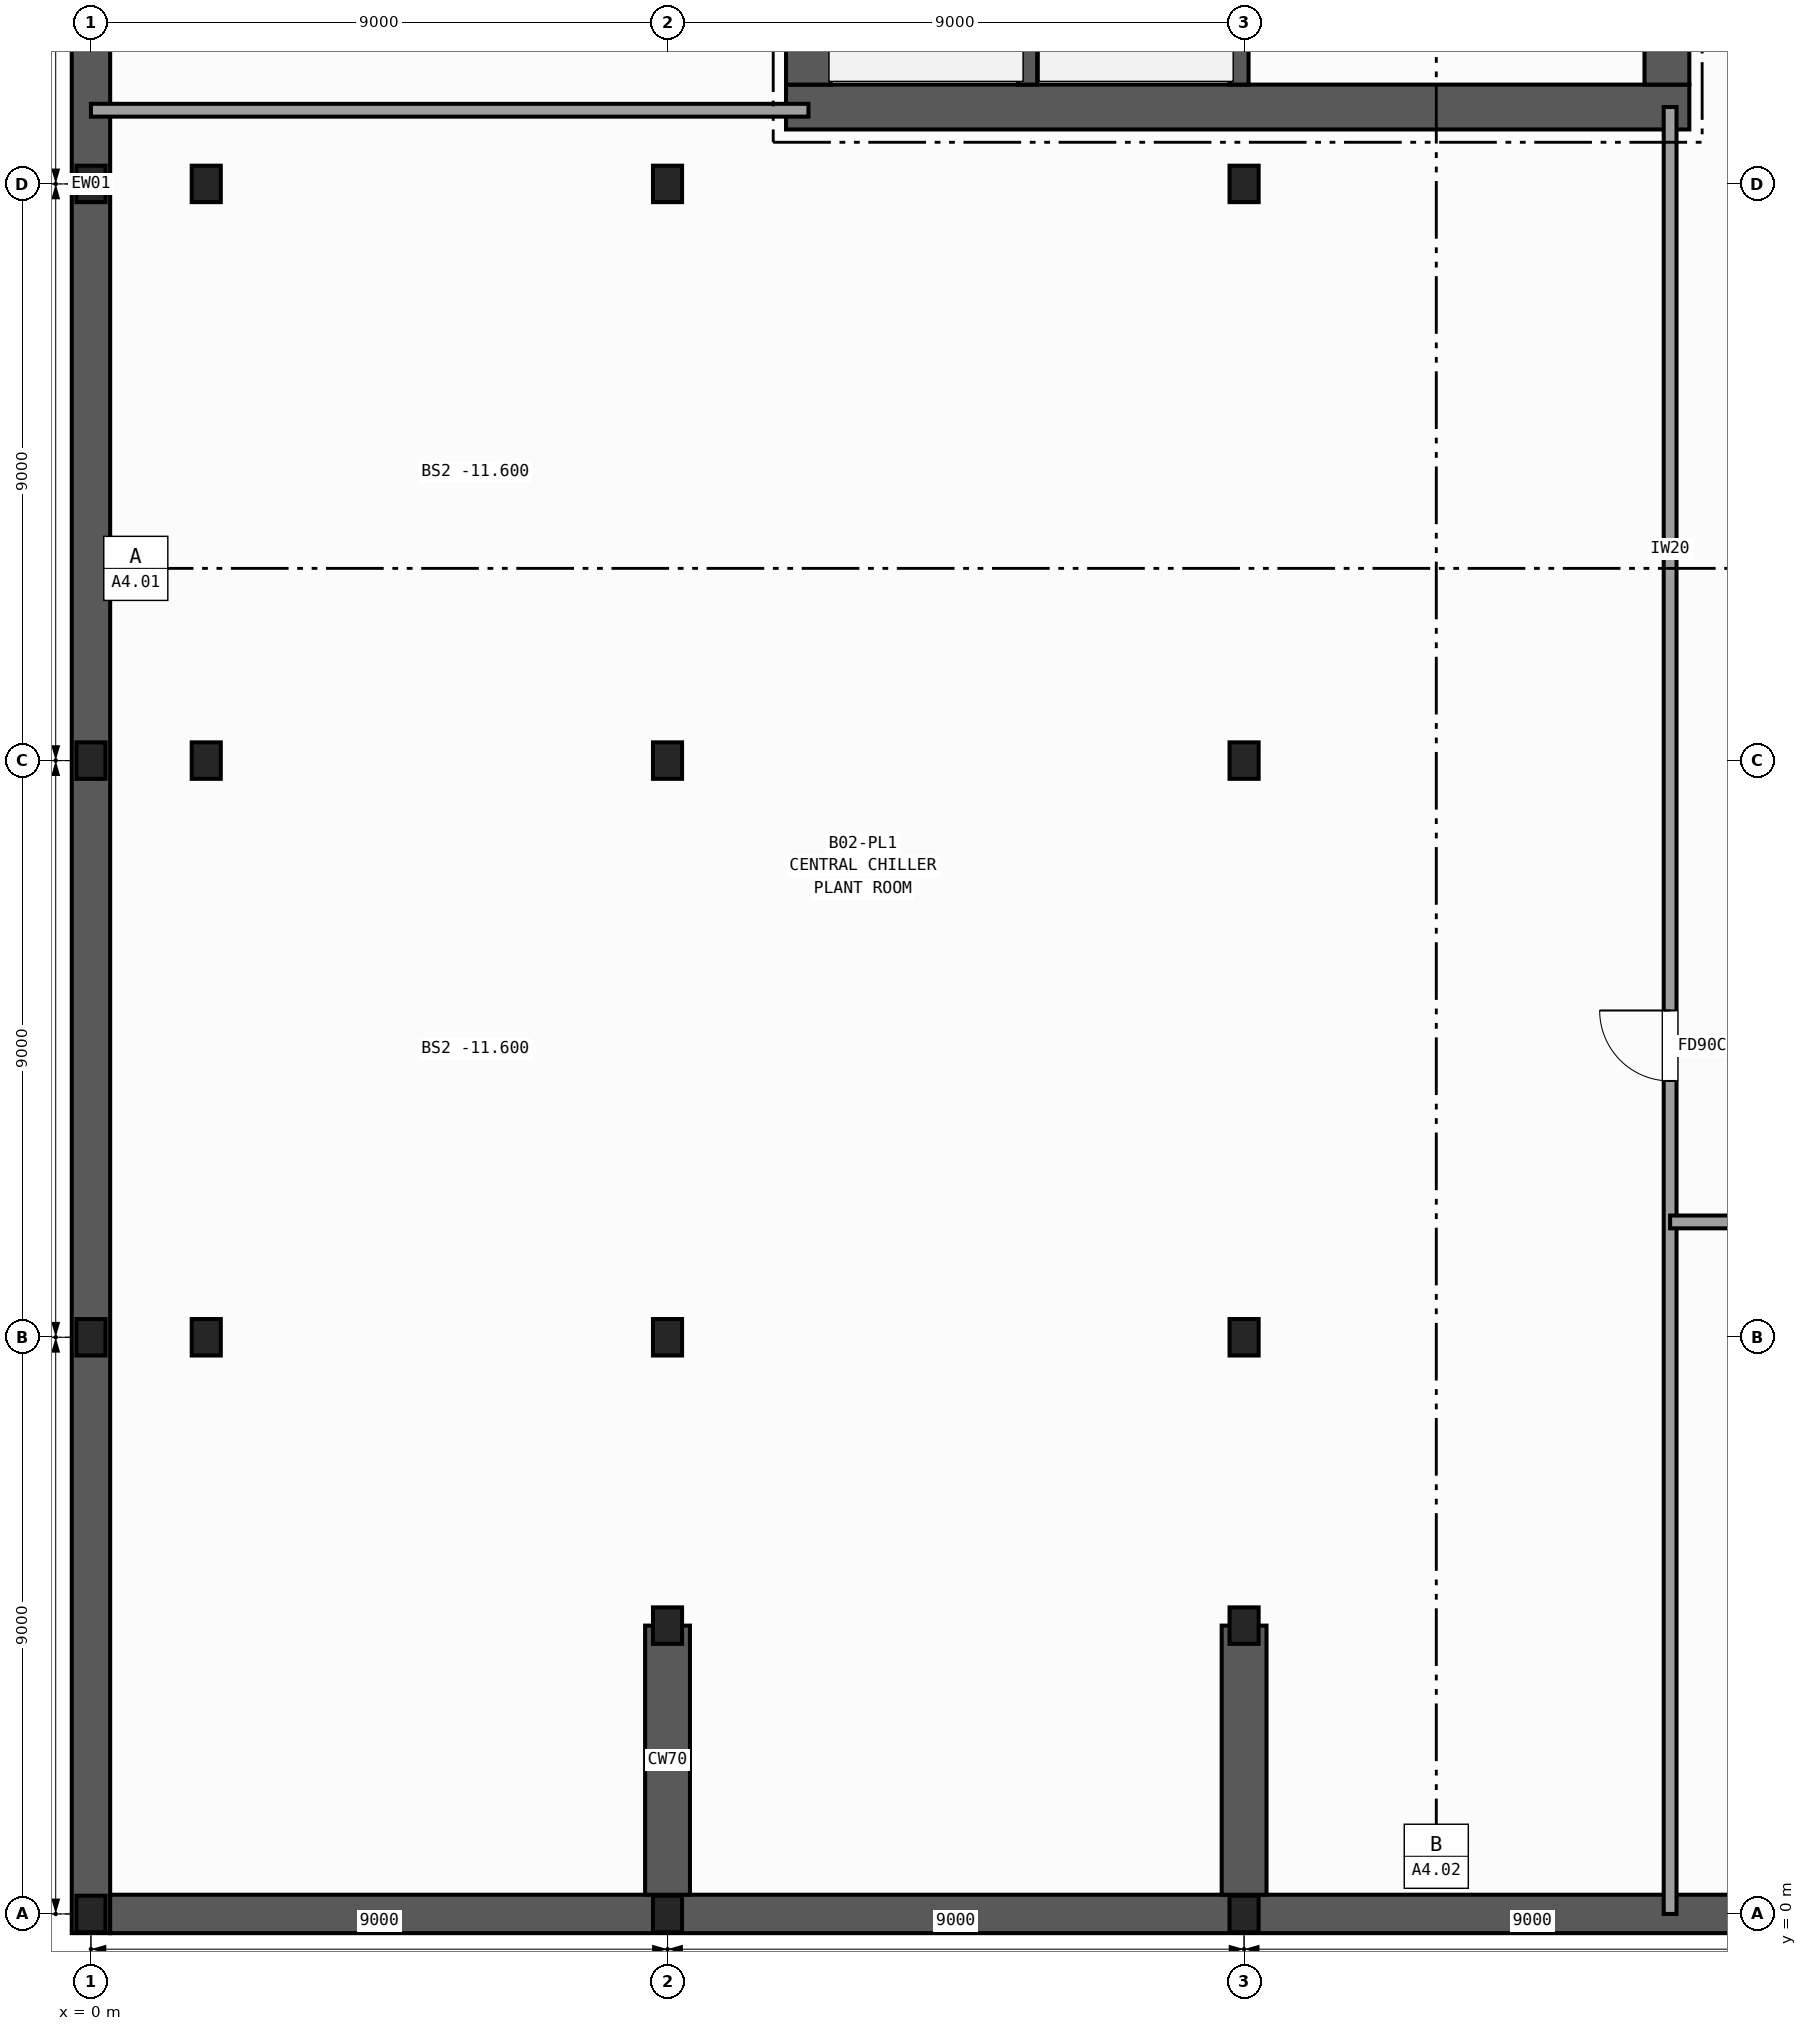
"""IFC4 building model, lengths in metres.
Left out: names, types, materials, properties, quantities, classifications, styles, units other than length and angle.
Written with IfcOpenShell. Run it as: python <this file> out.ifc"""

import sys

from ifc_helpers import new_model, si_unit, direction, frame, frame_2d, origin, origin_2d, place, context, subcontext, project, spatial, rectangle, i_section, extrude, element, fill, save


model = new_model("IFC4")
c1 = context("Model", 3, precision=1e-05, world=origin(), true_north=direction((0.0, 1.0)))
c2 = subcontext(c1, "Body", "Model", "MODEL_VIEW")
j1 = project(units=[si_unit("LENGTHUNIT", "METRE"), si_unit("PLANEANGLEUNIT", "RADIAN")], contexts=[c1])
p1 = place(None, origin())
s1 = spatial("IfcSite", under=j1, at=p1, CompositionType="ELEMENT")
p2 = place(p1, origin())
s2 = spatial("IfcBuilding", under=s1, at=p2, CompositionType="ELEMENT")
p3 = place(p2, frame((0.0, 0.0, -9.0)))
s3 = spatial("IfcBuildingStorey", under=s2, at=p3, CompositionType="ELEMENT", Elevation=-9.0)
for number, where, z_axis, x_axis in (
    (1, (0.0, 0.0, 0.0), (0.0, 0.0, 1.0), (1.0, 0.0, 0.0)),
    (2, (0.0, 9.0, 0.0), (0.0, 0.0, 1.0), (1.0, 0.0, 0.0)),
    (3, (0.0, 18.0, 0.0), (0.0, 0.0, 1.0), (1.0, 0.0, 0.0)),
    (4, (0.0, 27.0, 0.0), (0.0, 0.0, 1.0), (1.0, 0.0, 0.0)),
    (5, (9.0, 0.0, 0.0), (0.0, 0.0, 1.0), (1.0, 0.0, 0.0)),
    (6, (9.0, 9.0, 0.0), (0.0, 0.0, 1.0), (1.0, 0.0, 0.0)),
    (7, (9.0, 18.0, 0.0), (0.0, 0.0, 1.0), (1.0, 0.0, 0.0)),
    (8, (9.0, 27.0, 0.0), (0.0, 0.0, 1.0), (1.0, 0.0, 0.0)),
    (9, (18.0, 0.0, 0.0), (0.0, 0.0, 1.0), (1.0, 0.0, 0.0)),
    (10, (18.0, 9.0, 0.0), (0.0, 0.0, 1.0), (1.0, 0.0, 0.0)),
    (11, (18.0, 18.0, 0.0), (0.0, 0.0, 1.0), (1.0, 0.0, 0.0)),
    (12, (18.0, 27.0, 0.0), (0.0, 0.0, 1.0), (1.0, 0.0, 0.0)),
    (13, (9.0, 4.5, 0.0), (0.0, 0.0, 1.0), (1.0, 0.0, 0.0)),
    (14, (18.0, 4.5, 0.0), (0.0, 0.0, 1.0), (1.0, 0.0, 0.0)),
    (15, (1.8, 9.0, 0.0), (0.0, 0.0, 1.0), (1.0, 0.0, 0.0)),
    (16, (1.8, 18.0, 0.0), (0.0, 0.0, 1.0), (1.0, 0.0, 0.0)),
    (17, (1.8, 27.0, 0.0), (0.0, 0.0, 1.0), (1.0, 0.0, 0.0)),
):
    element("IfcColumn", number, at=place(p3, frame(where, z_axis=z_axis, x_axis=x_axis)), inside=s3, PredefinedType="COLUMN", context=c2, shape_type="SweptSolid", body=[
        extrude(i_section(OverallWidth=0.454, OverallDepth=0.569, WebThickness=0.078, FlangeThickness=0.125, FilletRadius=0.015, at=origin_2d()), origin(), (0.0, 0.0, 1.0), 4.5),
    ])
p4 = place(p3, frame((0.0, -0.3, 0.0), z_axis=(0.0, 0.0, 1.0), x_axis=(0.0, 1.0, 0.0)))
e18 = element("IfcWall", 18, at=p4, inside=s3, PredefinedType="SOLIDWALL", context=c2, shape_type="SweptSolid", body=[
    extrude(rectangle(XDim=54.6, YDim=0.6, at=frame_2d((27.3, 0.0))), origin(), (0.0, 0.0, 1.0), 4.15),
])
p5 = place(p3, frame((62.7, 0.0, 0.0), z_axis=(0.0, 0.0, 1.0), x_axis=(-1.0, 0.0, 0.0)))
e19 = element("IfcWall", 19, at=p5, inside=s3, PredefinedType="SOLIDWALL", context=c2, shape_type="SweptSolid", body=[
    extrude(rectangle(XDim=62.4, YDim=0.6, at=frame_2d((31.2, 0.0))), origin(), (0.0, 0.0, 1.0), 4.15),
])
for number, where, z_axis, x_axis in (
    (20, (9.0, 0.3, 0.0), (0.0, 0.0, 1.0), (0.0, 1.0, 0.0)),
    (21, (18.0, 0.3, 0.0), (0.0, 0.0, 1.0), (0.0, 1.0, 0.0)),
):
    element("IfcWall", number, at=place(p3, frame(where, z_axis=z_axis, x_axis=x_axis)), inside=s3, PredefinedType="SHEAR", context=c2, shape_type="SweptSolid", body=[
        extrude(rectangle(XDim=4.2, YDim=0.7, at=frame_2d((2.1, 0.0))), origin(), (0.0, 0.0, 1.0), 4.15),
    ])
p6 = place(p3, frame((10.85, 28.2, 0.0), z_axis=(0.0, 0.0, 1.0), x_axis=(1.0, 0.0, 0.0)))
e22 = element("IfcWall", 22, at=p6, inside=s3, PredefinedType="SHEAR", context=c2, shape_type="SweptSolid", body=[
    extrude(rectangle(XDim=14.1, YDim=0.7, at=frame_2d((7.05, 0.0))), origin(), (0.0, 0.0, 1.0), 4.15),
])
p7 = place(p3, frame((11.2, 42.05, 0.0), z_axis=(0.0, 0.0, 1.0), x_axis=(0.0, -1.0, 0.0)))
e23 = element("IfcWall", 23, at=p7, inside=s3, PredefinedType="SHEAR", context=c2, shape_type="SweptSolid", body=[
    extrude(rectangle(XDim=13.5, YDim=0.7, at=frame_2d((6.75, 0.0))), origin(), (0.0, 0.0, 1.0), 4.15),
])
p8 = place(p3, frame((24.6, 28.55, 0.0), z_axis=(0.0, 0.0, 1.0), x_axis=(0.0, 1.0, 0.0)))
e24 = element("IfcWall", 24, at=p8, inside=s3, PredefinedType="SHEAR", context=c2, shape_type="SweptSolid", body=[
    extrude(rectangle(XDim=13.5, YDim=0.7, at=frame_2d((6.75, 0.0))), origin(), (0.0, 0.0, 1.0), 4.15),
])
p9 = place(p8, frame((3.25, 0.0, 0.0)))
e25 = element("IfcOpeningElement", 25, at=p9, cuts=e24, PredefinedType="OPENING", context=c2, shape_type="SweptSolid", body=[
    extrude(rectangle(XDim=1.5, YDim=2.2, at=frame_2d((0.75, 1.1))), frame((0.0, 0.36, 0.0), z_axis=(0.0, -1.0, 0.0), x_axis=(1.0, 0.0, 0.0)), (0.0, 0.0, 1.0), 0.72),
])
p10 = place(p8, frame((9.85, 0.0, 0.0)))
e26 = element("IfcOpeningElement", 26, at=p10, cuts=e24, PredefinedType="OPENING", context=c2, shape_type="SweptSolid", body=[
    extrude(rectangle(XDim=0.9, YDim=2.1, at=frame_2d((0.45, 1.05))), frame((0.0, 0.36, 0.0), z_axis=(0.0, -1.0, 0.0), x_axis=(1.0, 0.0, 0.0)), (0.0, 0.0, 1.0), 0.72),
])
p11 = place(p3, frame((14.62, 28.55, 0.0), z_axis=(0.0, 0.0, 1.0), x_axis=(0.0, 1.0, 0.0)))
e27 = element("IfcWall", 27, at=p11, inside=s3, PredefinedType="SHEAR", context=c2, shape_type="SweptSolid", body=[
    extrude(rectangle(XDim=8.9, YDim=0.3, at=frame_2d((4.45, 0.0))), origin(), (0.0, 0.0, 1.0), 4.15),
])
p12 = place(p3, frame((17.92, 42.05, 0.0), z_axis=(0.0, 0.0, 1.0), x_axis=(0.0, -1.0, 0.0)))
e28 = element("IfcWall", 28, at=p12, inside=s3, PredefinedType="SHEAR", context=c2, shape_type="SweptSolid", body=[
    extrude(rectangle(XDim=13.5, YDim=0.3, at=frame_2d((6.75, 0.0))), origin(), (0.0, 0.0, 1.0), 4.15),
])
p13 = place(p12, frame((1.875, 0.0, 0.0)))
e29 = element("IfcOpeningElement", 29, at=p13, cuts=e28, PredefinedType="OPENING", context=c2, shape_type="SweptSolid", body=[
    extrude(rectangle(XDim=1.15, YDim=2.15, at=frame_2d((0.575, 1.075))), frame((0.0, 0.16, 0.0), z_axis=(0.0, -1.0, 0.0), x_axis=(1.0, 0.0, 0.0)), (0.0, 0.0, 1.0), 0.32),
])
p14 = place(p3, frame((24.65, 0.0, 0.0), z_axis=(0.0, 0.0, 1.0), x_axis=(0.0, 1.0, 0.0)))
e30 = element("IfcWall", 30, at=p14, inside=s3, PredefinedType="PARTITIONING", context=c2, shape_type="SweptSolid", body=[
    extrude(rectangle(XDim=28.2, YDim=0.2, at=frame_2d((14.1, 0.0))), origin(), (0.0, 0.0, 1.0), 3.203),
])
p15 = place(p14, frame((13.0, 0.0, 0.0)))
e31 = element("IfcOpeningElement", 31, at=p15, cuts=e30, PredefinedType="OPENING", context=c2, shape_type="SweptSolid", body=[
    extrude(rectangle(XDim=1.1, YDim=2.15, at=frame_2d((0.55, 1.075))), frame((0.0, 0.11, 0.0), z_axis=(0.0, -1.0, 0.0), x_axis=(1.0, 0.0, 0.0)), (0.0, 0.0, 1.0), 0.22),
])
p16 = place(p3, frame((0.0, 28.15, 0.0), z_axis=(0.0, 0.0, 1.0), x_axis=(1.0, 0.0, 0.0)))
e32 = element("IfcWall", 32, at=p16, inside=s3, PredefinedType="PARTITIONING", context=c2, shape_type="SweptSolid", body=[
    extrude(rectangle(XDim=11.2, YDim=0.2, at=frame_2d((5.6, 0.0))), origin(), (0.0, 0.0, 1.0), 3.275),
])
p17 = place(p3, frame((24.65, 10.8, 0.0), z_axis=(0.0, 0.0, 1.0), x_axis=(1.0, 0.0, 0.0)))
e33 = element("IfcWall", 33, at=p17, inside=s3, PredefinedType="PARTITIONING", context=c2, shape_type="SweptSolid", body=[
    extrude(rectangle(XDim=38.35, YDim=0.2, at=frame_2d((19.175, 0.0))), origin(), (0.0, 0.0, 1.0), 3.275),
])
p18 = place(p17, frame((2.0, 0.0, 0.0)))
e34 = element("IfcOpeningElement", 34, at=p18, cuts=e33, PredefinedType="OPENING", context=c2, shape_type="SweptSolid", body=[
    extrude(rectangle(XDim=1.1, YDim=2.15, at=frame_2d((0.55, 1.075))), frame((0.0, 0.11, 0.0), z_axis=(0.0, -1.0, 0.0), x_axis=(1.0, 0.0, 0.0)), (0.0, 0.0, 1.0), 0.22),
])
p19 = place(p15, origin())
e35 = element("IfcDoor", 35, at=p19, inside=s3, OperationType="SINGLE_SWING_RIGHT", PredefinedType="DOOR", context=c2, shape_type="SweptSolid", body=[
    extrude(rectangle(XDim=1.1, YDim=2.15, at=frame_2d((0.55, 1.075))), frame((0.0, 0.025, 0.0), z_axis=(0.0, -1.0, 0.0), x_axis=(1.0, 0.0, 0.0)), (0.0, 0.0, 1.0), 0.05),
])
fill(e31, e35)
save(model, sys.argv[1])
